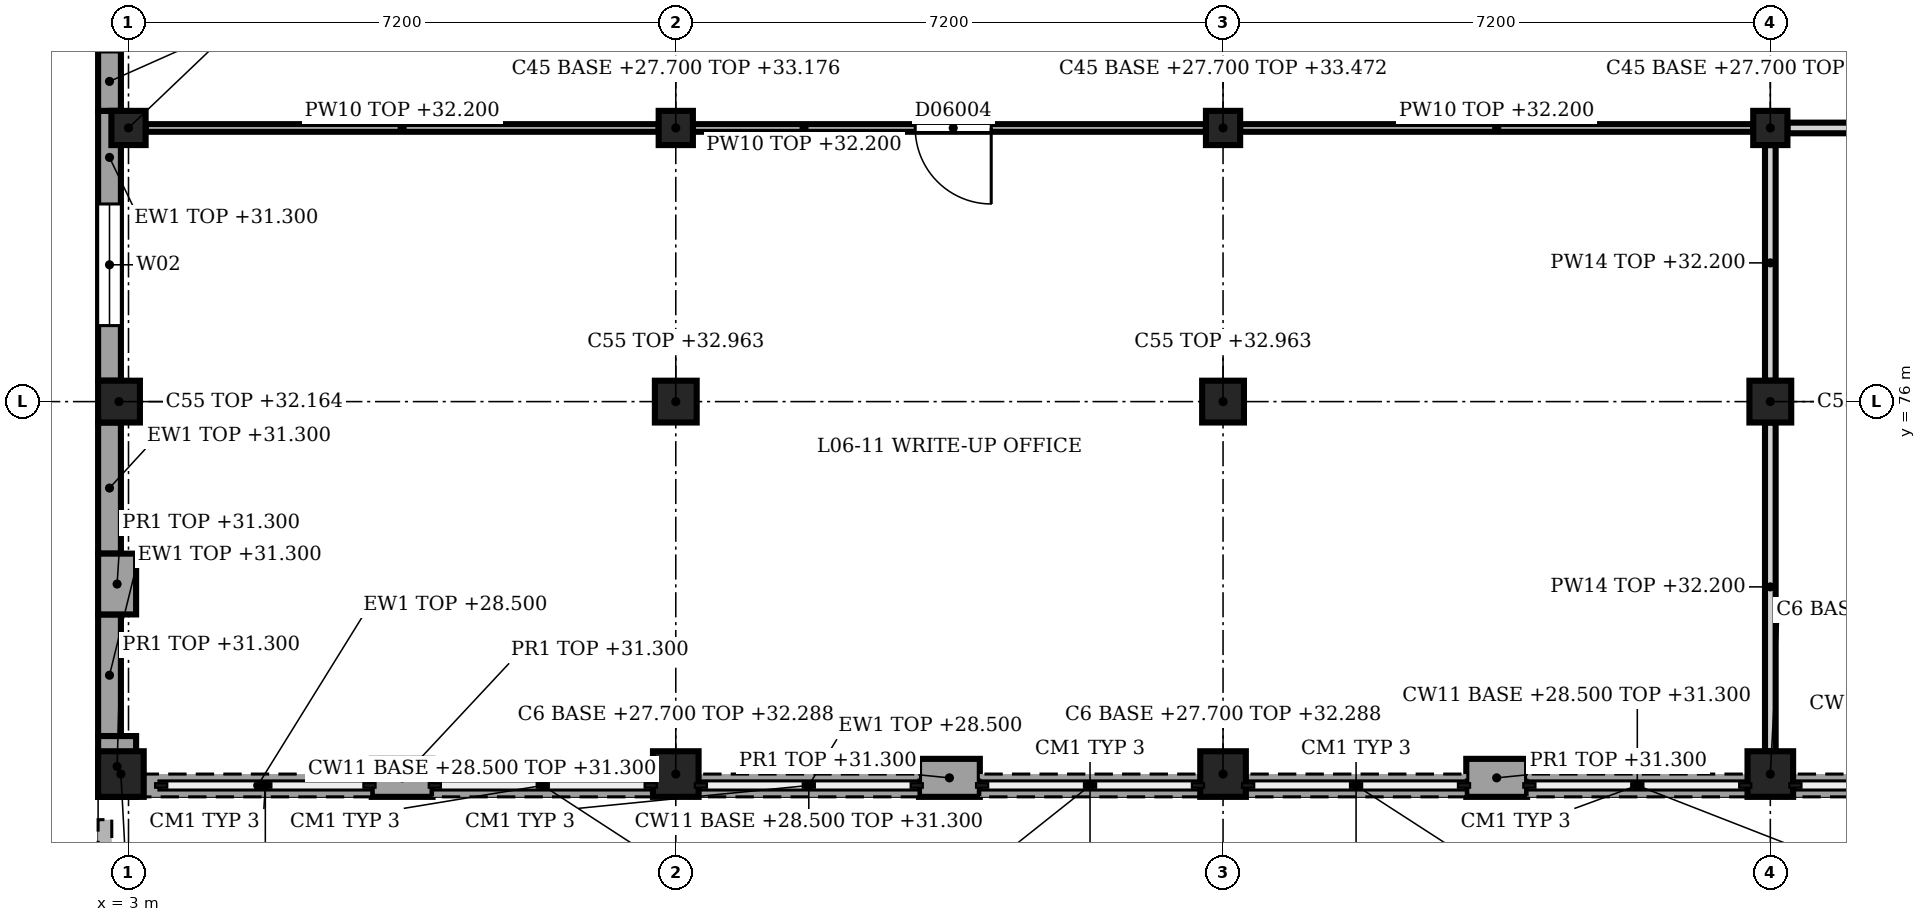
"""IFC4 building model, lengths in metres.
Left out: names, types, materials, properties, quantities, classifications, styles, units other than length and angle.
Written with IfcOpenShell. Run it as: python <this file> out.ifc"""

import sys

from ifc_helpers import new_model, si_unit, direction, frame, frame_2d, origin, origin_2d, place, context, subcontext, project, spatial, rectangle, extrude, element, fill, save


model = new_model("IFC4")
c1 = context("Model", 3, precision=1e-05, world=origin(), true_north=direction((0.0, 1.0)))
c2 = subcontext(c1, "Body", "Model", "MODEL_VIEW")
j1 = project(units=[si_unit("LENGTHUNIT", "METRE"), si_unit("PLANEANGLEUNIT", "RADIAN")], contexts=[c1])
p1 = place(None, origin())
s1 = spatial("IfcSite", under=j1, at=p1, CompositionType="ELEMENT")
p2 = place(p1, origin())
s2 = spatial("IfcBuilding", under=s1, at=p2, CompositionType="ELEMENT")
p3 = place(p2, frame((0.0, 0.0, 27.9)))
s3 = spatial("IfcBuildingStorey", under=s2, at=p3, CompositionType="ELEMENT", Elevation=27.9)
p4 = place(p3, frame((2.875, 76.0, 0.0), z_axis=(0.0, 0.0, 1.0), x_axis=(1.0, 0.0, 0.0)))
e1 = element("IfcColumn", 1, at=p4, inside=s3, PredefinedType="COLUMN", context=c2, shape_type="SweptSolid", body=[
    extrude(rectangle(XDim=0.55, YDim=0.55, at=origin_2d()), origin(), (0.0, 0.0, 1.0), 4.265),
])
for number, where, z_axis, x_axis in (
    (2, (10.2, 76.0, 0.0), (0.0, 0.0, 1.0), (1.0, 0.0, 0.0)),
    (3, (17.4, 76.0, 0.0), (0.0, 0.0, 1.0), (1.0, 0.0, 0.0)),
    (4, (24.6, 76.0, 0.0), (0.0, 0.0, 1.0), (1.0, 0.0, 0.0)),
):
    element("IfcColumn", number, at=place(p3, frame(where, z_axis=z_axis, x_axis=x_axis)), inside=s3, PredefinedType="COLUMN", context=c2, shape_type="SweptSolid", body=[
        extrude(rectangle(XDim=0.55, YDim=0.55, at=origin_2d()), origin(), (0.0, 0.0, 1.0), 5.063),
    ])
p5 = place(p3, frame((2.9, 71.1, -0.2), z_axis=(0.0, 0.0, 1.0), x_axis=(1.0, 0.0, 0.0)))
e5 = element("IfcColumn", 5, at=p5, inside=s3, PredefinedType="COLUMN", context=c2, shape_type="SweptSolid", body=[
    extrude(rectangle(XDim=0.6, YDim=0.6, at=origin_2d()), origin(), (0.0, 0.0, 1.0), 4.465),
])
for number, where, z_axis, x_axis in (
    (6, (10.2, 71.1, -0.2), (0.0, 0.0, 1.0), (1.0, 0.0, 0.0)),
    (7, (17.4, 71.1, -0.2), (0.0, 0.0, 1.0), (1.0, 0.0, 0.0)),
    (8, (24.6, 71.1, -0.2), (0.0, 0.0, 1.0), (1.0, 0.0, 0.0)),
):
    element("IfcColumn", number, at=place(p3, frame(where, z_axis=z_axis, x_axis=x_axis)), inside=s3, PredefinedType="COLUMN", context=c2, shape_type="SweptSolid", body=[
        extrude(rectangle(XDim=0.6, YDim=0.6, at=origin_2d()), origin(), (0.0, 0.0, 1.0), 4.588),
    ])
p6 = place(p3, frame((3.0, 79.6, -0.2), z_axis=(0.0, 0.0, 1.0), x_axis=(1.0, 0.0, 0.0)))
e9 = element("IfcColumn", 9, at=p6, inside=s3, PredefinedType="COLUMN", context=c2, shape_type="SweptSolid", body=[
    extrude(rectangle(XDim=0.45, YDim=0.45, at=origin_2d()), origin(), (0.0, 0.0, 1.0), 4.465),
])
p7 = place(p3, frame((10.2, 79.6, -0.2), z_axis=(0.0, 0.0, 1.0), x_axis=(1.0, 0.0, 0.0)))
e10 = element("IfcColumn", 10, at=p7, inside=s3, PredefinedType="COLUMN", context=c2, shape_type="SweptSolid", body=[
    extrude(rectangle(XDim=0.45, YDim=0.45, at=origin_2d()), origin(), (0.0, 0.0, 1.0), 5.477),
])
for number, where, z_axis, x_axis in (
    (11, (17.4, 79.6, -0.2), (0.0, 0.0, 1.0), (1.0, 0.0, 0.0)),
    (12, (24.6, 79.6, -0.2), (0.0, 0.0, 1.0), (1.0, 0.0, 0.0)),
):
    element("IfcColumn", number, at=place(p3, frame(where, z_axis=z_axis, x_axis=x_axis)), inside=s3, PredefinedType="COLUMN", context=c2, shape_type="SweptSolid", body=[
        extrude(rectangle(XDim=0.45, YDim=0.45, at=origin_2d()), origin(), (0.0, 0.0, 1.0), 5.772),
    ])
p8 = place(p3, frame((21.4, 71.05, 0.0), z_axis=(0.0, 0.0, 1.0), x_axis=(-1.0, 0.0, 0.0)))
e13 = element("IfcWall", 13, at=p8, inside=s3, PredefinedType="SOLIDWALL", context=c2, shape_type="SweptSolid", body=[
    extrude(rectangle(XDim=0.8, YDim=0.5, at=frame_2d((0.4, 0.0))), origin(), (0.0, 0.0, 1.0), 3.4),
])
for number, where, z_axis, x_axis in (
    (14, (14.2, 71.05, 0.0), (0.0, 0.0, 1.0), (-1.0, 0.0, 0.0)),
    (15, (7.0, 71.05, 0.0), (0.0, 0.0, 1.0), (-1.0, 0.0, 0.0)),
):
    element("IfcWall", number, at=place(p3, frame(where, z_axis=z_axis, x_axis=x_axis)), inside=s3, PredefinedType="SOLIDWALL", context=c2, shape_type="SweptSolid", body=[
        extrude(rectangle(XDim=0.8, YDim=0.5, at=frame_2d((0.4, 0.0))), origin(), (0.0, 0.0, 1.0), 3.4),
    ])
for number, where, z_axis, x_axis in (
    (16, (27.8, 70.95, 0.0), (0.0, 0.0, 1.0), (-1.0, 0.0, 0.0)),
    (17, (24.3, 70.95, 0.0), (0.0, 0.0, 1.0), (-1.0, 0.0, 0.0)),
    (18, (20.6, 70.95, 0.0), (0.0, 0.0, 1.0), (-1.0, 0.0, 0.0)),
    (19, (17.1, 70.95, 0.0), (0.0, 0.0, 1.0), (-1.0, 0.0, 0.0)),
):
    element("IfcWall", number, at=place(p3, frame(where, z_axis=z_axis, x_axis=x_axis)), inside=s3, PredefinedType="SOLIDWALL", context=c2, shape_type="SweptSolid", body=[
        extrude(rectangle(XDim=2.9, YDim=0.3, at=frame_2d((1.45, 0.0))), origin(), (0.0, 0.0, 1.0), 0.6),
    ])
for number, where, z_axis, x_axis in (
    (20, (13.4, 70.95, 0.0), (0.0, 0.0, 1.0), (-1.0, 0.0, 0.0)),
    (21, (9.9, 70.95, 0.0), (0.0, 0.0, 1.0), (-1.0, 0.0, 0.0)),
):
    element("IfcWall", number, at=place(p3, frame(where, z_axis=z_axis, x_axis=x_axis)), inside=s3, PredefinedType="SOLIDWALL", context=c2, shape_type="SweptSolid", body=[
        extrude(rectangle(XDim=2.9, YDim=0.3, at=frame_2d((1.45, 0.0))), origin(), (0.0, 0.0, 1.0), 0.6),
    ])
p9 = place(p3, frame((6.2, 70.95, 0.0), z_axis=(0.0, 0.0, 1.0), x_axis=(-1.0, 0.0, 0.0)))
e22 = element("IfcWall", 22, at=p9, inside=s3, PredefinedType="SOLIDWALL", context=c2, shape_type="SweptSolid", body=[
    extrude(rectangle(XDim=3.0, YDim=0.3, at=frame_2d((1.5, 0.0))), origin(), (0.0, 0.0, 1.0), 0.6),
])
for number, where, z_axis, x_axis in (
    (23, (2.85, 70.8, 0.0), (0.0, 0.0, 1.0), (0.0, 1.0, 0.0)),
    (24, (2.85, 73.2, 0.0), (0.0, 0.0, 1.0), (0.0, 1.0, 0.0)),
):
    element("IfcWall", number, at=place(p3, frame(where, z_axis=z_axis, x_axis=x_axis)), inside=s3, PredefinedType="SOLIDWALL", context=c2, shape_type="SweptSolid", body=[
        extrude(rectangle(XDim=0.8, YDim=0.5, at=frame_2d((0.4, 0.0))), origin(), (0.0, 0.0, 1.0), 3.4),
    ])
p10 = place(p3, frame((2.75, 71.6, 0.0), z_axis=(0.0, 0.0, 1.0), x_axis=(0.0, 1.0, 0.0)))
e25 = element("IfcWall", 25, at=p10, inside=s3, PredefinedType="SOLIDWALL", context=c2, shape_type="SweptSolid", body=[
    extrude(rectangle(XDim=1.6, YDim=0.3, at=frame_2d((0.8, 0.0))), origin(), (0.0, 0.0, 1.0), 3.4),
])
p11 = place(p3, frame((2.75, 74.0, 0.0), z_axis=(0.0, 0.0, 1.0), x_axis=(0.0, 1.0, 0.0)))
e26 = element("IfcWall", 26, at=p11, inside=s3, PredefinedType="SOLIDWALL", context=c2, shape_type="SweptSolid", body=[
    extrude(rectangle(XDim=1.725, YDim=0.3, at=frame_2d((0.863, 0.0))), origin(), (0.0, 0.0, 1.0), 3.4),
])
p12 = place(p3, frame((2.75, 76.275, 0.0), z_axis=(0.0, 0.0, 1.0), x_axis=(0.0, 1.0, 0.0)))
e27 = element("IfcWall", 27, at=p12, inside=s3, PredefinedType="SOLIDWALL", context=c2, shape_type="SweptSolid", body=[
    extrude(rectangle(XDim=3.55, YDim=0.3, at=frame_2d((1.775, 0.0))), origin(), (0.0, 0.0, 1.0), 3.4),
])
p13 = place(p12, frame((0.725, 0.0, 0.9)))
e28 = element("IfcOpeningElement", 28, at=p13, cuts=e27, PredefinedType="OPENING", context=c2, shape_type="SweptSolid", body=[
    extrude(rectangle(XDim=1.6, YDim=1.8, at=frame_2d((0.8, 0.9))), frame((0.0, 0.16, 0.0), z_axis=(0.0, -1.0, 0.0), x_axis=(1.0, 0.0, 0.0)), (0.0, 0.0, 1.0), 0.32),
])
p14 = place(p3, frame((2.75, 79.825, 0.0), z_axis=(0.0, 0.0, 1.0), x_axis=(0.0, 1.0, 0.0)))
e29 = element("IfcWall", 29, at=p14, inside=s3, PredefinedType="SOLIDWALL", context=c2, shape_type="SweptSolid", body=[
    extrude(rectangle(XDim=3.1, YDim=0.3, at=frame_2d((1.55, 0.0))), origin(), (0.0, 0.0, 1.0), 3.4),
])
p15 = place(p14, frame((0.775, 0.0, 0.9)))
e30 = element("IfcOpeningElement", 30, at=p15, cuts=e29, PredefinedType="OPENING", context=c2, shape_type="SweptSolid", body=[
    extrude(rectangle(XDim=1.6, YDim=1.8, at=frame_2d((0.8, 0.9))), frame((0.0, 0.16, 0.0), z_axis=(0.0, -1.0, 0.0), x_axis=(1.0, 0.0, 0.0)), (0.0, 0.0, 1.0), 0.32),
])
p16 = place(p3, frame((2.69, 70.5, 0.0), z_axis=(0.0, 0.0, 1.0), x_axis=(0.0, -1.0, 0.0)))
e31 = element("IfcWall", 31, at=p16, inside=s3, PredefinedType="PARAPET", context=c2, shape_type="SweptSolid", body=[
    extrude(rectangle(XDim=1.8, YDim=0.18, at=frame_2d((0.9, 0.0))), origin(), (0.0, 0.0, 1.0), 1.1),
])
p17 = place(p3, frame((3.225, 79.6, 0.0), z_axis=(0.0, 0.0, 1.0), x_axis=(1.0, 0.0, 0.0)))
e32 = element("IfcWall", 32, at=p17, inside=s3, PredefinedType="PARTITIONING", context=c2, shape_type="SweptSolid", body=[
    extrude(rectangle(XDim=6.75, YDim=0.1, at=frame_2d((3.375, 0.0))), origin(), (0.0, 0.0, 1.0), 4.3),
])
p18 = place(p3, frame((17.175, 79.6, 0.0), z_axis=(0.0, 0.0, 1.0), x_axis=(-1.0, 0.0, 0.0)))
e33 = element("IfcWall", 33, at=p18, inside=s3, PredefinedType="PARTITIONING", context=c2, shape_type="SweptSolid", body=[
    extrude(rectangle(XDim=6.75, YDim=0.1, at=frame_2d((3.375, 0.0))), origin(), (0.0, 0.0, 1.0), 4.3),
])
p19 = place(p18, frame((2.825, 0.0, 0.0)))
e34 = element("IfcOpeningElement", 34, at=p19, cuts=e33, PredefinedType="OPENING", context=c2, shape_type="SweptSolid", body=[
    extrude(rectangle(XDim=1.0, YDim=2.1, at=frame_2d((0.5, 1.05))), frame((0.0, 0.06, 0.0), z_axis=(0.0, -1.0, 0.0), x_axis=(1.0, 0.0, 0.0)), (0.0, 0.0, 1.0), 0.12),
])
p20 = place(p3, frame((17.625, 79.6, 0.0), z_axis=(0.0, 0.0, 1.0), x_axis=(1.0, 0.0, 0.0)))
e35 = element("IfcWall", 35, at=p20, inside=s3, PredefinedType="PARTITIONING", context=c2, shape_type="SweptSolid", body=[
    extrude(rectangle(XDim=6.75, YDim=0.1, at=frame_2d((3.375, 0.0))), origin(), (0.0, 0.0, 1.0), 4.3),
])
p21 = place(p3, frame((24.825, 79.6, 0.0), z_axis=(0.0, 0.0, 1.0), x_axis=(1.0, 0.0, 0.0)))
e36 = element("IfcWall", 36, at=p21, inside=s3, PredefinedType="PARTITIONING", context=c2, shape_type="SweptSolid", body=[
    extrude(rectangle(XDim=6.75, YDim=0.14, at=frame_2d((3.375, 0.0))), origin(), (0.0, 0.0, 1.0), 4.3),
])
p22 = place(p3, frame((24.6, 71.4, 0.0), z_axis=(0.0, 0.0, 1.0), x_axis=(0.0, 1.0, 0.0)))
e37 = element("IfcWall", 37, at=p22, inside=s3, PredefinedType="PARTITIONING", context=c2, shape_type="SweptSolid", body=[
    extrude(rectangle(XDim=4.325, YDim=0.14, at=frame_2d((2.163, 0.0))), origin(), (0.0, 0.0, 1.0), 4.3),
])
p23 = place(p3, frame((24.6, 76.275, 0.0), z_axis=(0.0, 0.0, 1.0), x_axis=(0.0, 1.0, 0.0)))
e38 = element("IfcWall", 38, at=p23, inside=s3, PredefinedType="PARTITIONING", context=c2, shape_type="SweptSolid", body=[
    extrude(rectangle(XDim=3.1, YDim=0.14, at=frame_2d((1.55, 0.0))), origin(), (0.0, 0.0, 1.0), 4.3),
])
p24 = place(p13, origin())
e39 = element("IfcWindow", 39, at=p24, inside=s3, PartitioningType="SINGLE_PANEL", PredefinedType="WINDOW", context=c2, shape_type="SweptSolid", body=[
    extrude(rectangle(XDim=1.6, YDim=1.8, at=frame_2d((0.8, 0.9))), frame((0.0, 0.03, 0.0), z_axis=(0.0, -1.0, 0.0), x_axis=(1.0, 0.0, 0.0)), (0.0, 0.0, 1.0), 0.06),
])
fill(e28, e39)
p25 = place(p15, origin())
e40 = element("IfcWindow", 40, at=p25, inside=s3, PartitioningType="SINGLE_PANEL", PredefinedType="WINDOW", context=c2, shape_type="SweptSolid", body=[
    extrude(rectangle(XDim=1.6, YDim=1.8, at=frame_2d((0.8, 0.9))), frame((0.0, 0.03, 0.0), z_axis=(0.0, -1.0, 0.0), x_axis=(1.0, 0.0, 0.0)), (0.0, 0.0, 1.0), 0.06),
])
fill(e30, e40)
p26 = place(p19, origin())
e41 = element("IfcDoor", 41, at=p26, inside=s3, OperationType="SINGLE_SWING_LEFT", PredefinedType="DOOR", context=c2, shape_type="SweptSolid", body=[
    extrude(rectangle(XDim=1.0, YDim=2.1, at=frame_2d((0.5, 1.05))), frame((0.0, 0.025, 0.0), z_axis=(0.0, -1.0, 0.0), x_axis=(1.0, 0.0, 0.0)), (0.0, 0.0, 1.0), 0.05),
])
fill(e34, e41)
save(model, sys.argv[1])
